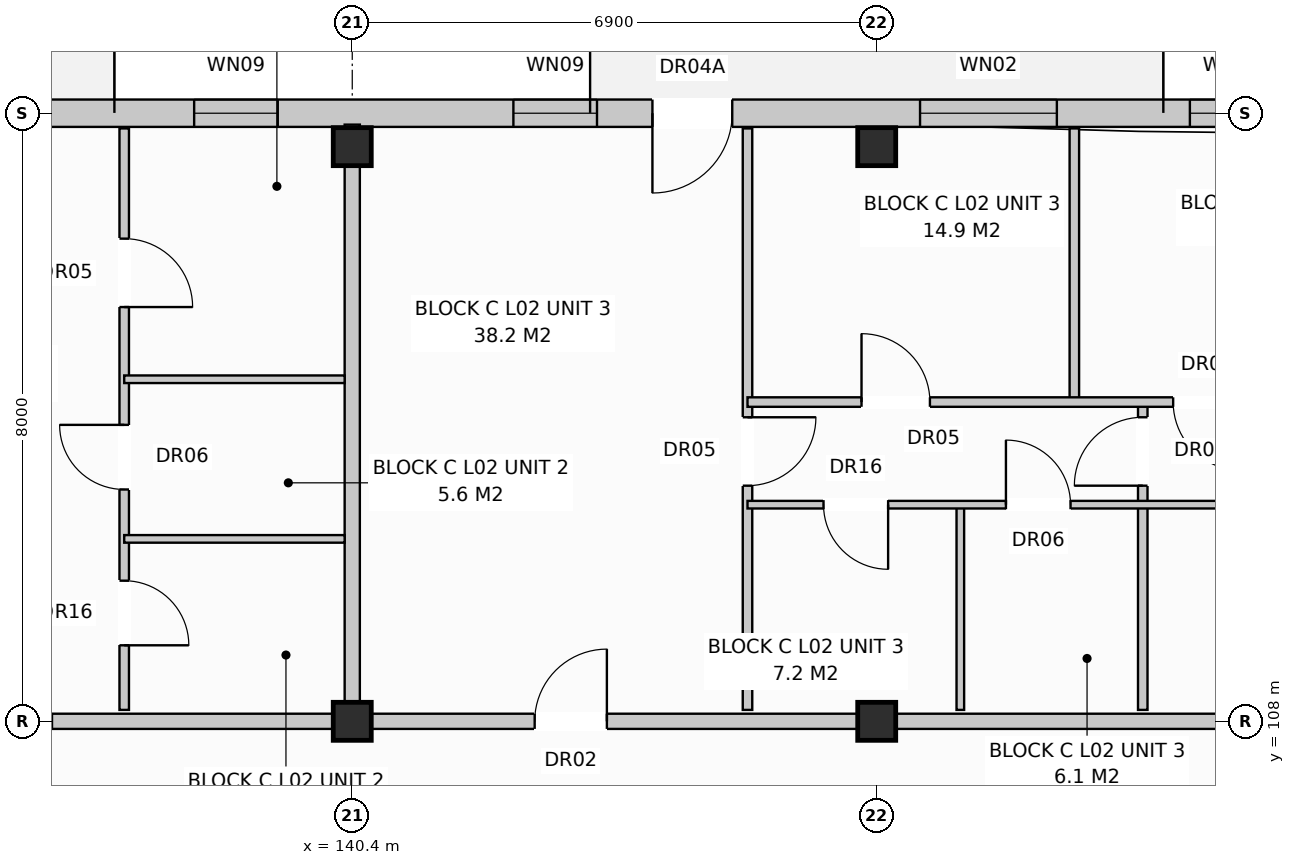
"""IFC4 building model, lengths in metres.
Left out: names, types, materials, properties, quantities, classifications, styles, units other than length and angle.
Written with IfcOpenShell. Run it as: python <this file> out.ifc"""

import sys

from ifc_helpers import new_model, si_unit, direction, frame, frame_2d, origin, origin_with_axes, origin_2d, place, context, subcontext, project, spatial, rectangle, extrude, element, fill, save


model = new_model("IFC4")
c1 = context("Model", 3, precision=1e-05, world=origin(), true_north=direction((0.0, 1.0)))
c2 = subcontext(c1, "Body", "Model", "MODEL_VIEW")
j1 = project(units=[si_unit("LENGTHUNIT", "METRE"), si_unit("PLANEANGLEUNIT", "RADIAN")], contexts=[c1])
p1 = place(None, origin())
s1 = spatial("IfcSite", under=j1, at=p1, CompositionType="ELEMENT")
p2 = place(p1, origin())
s2 = spatial("IfcBuilding", under=s1, at=p2, CompositionType="ELEMENT")
p3 = place(p2, frame((0.0, 0.0, 8.0)))
s3 = spatial("IfcBuildingStorey", under=s2, at=p3, CompositionType="ELEMENT", Elevation=8.0)
for number, where, z_axis, x_axis in (
    (1, (140.4, 108.0, 0.0), (0.0, 0.0, 1.0), (1.0, 0.0, 0.0)),
    (2, (140.4, 115.56, 0.0), (0.0, 0.0, 1.0), (1.0, 0.0, 0.0)),
    (3, (147.3, 108.0, 0.0), (0.0, 0.0, 1.0), (1.0, 0.0, 0.0)),
    (4, (147.3, 115.56, 0.0), (0.0, 0.0, 1.0), (1.0, 0.0, 0.0)),
):
    element("IfcColumn", number, at=place(p3, frame(where, z_axis=z_axis, x_axis=x_axis)), inside=s3, PredefinedType="COLUMN", context=c2, shape_type="SweptSolid", body=[
        extrude(rectangle(XDim=0.5, YDim=0.5, at=origin_2d()), origin(), (0.0, 0.0, 1.0), 3.2),
    ])
p4 = place(p3, frame((112.97, 116.0, 0.0), z_axis=(0.0, 0.0, 1.0), x_axis=(1.0, 0.0, 0.0)))
e5 = element("IfcWall", 5, at=p4, inside=s3, PredefinedType="STANDARD", context=c2, shape_type="SweptSolid", body=[
    extrude(rectangle(XDim=54.86, YDim=0.36, at=frame_2d((27.43, 0.0))), origin(), (0.0, 0.0, 1.0), 2.94),
])
p5 = place(p4, frame((4.876, 0.0, 0.0)))
e6 = element("IfcOpeningElement", 6, at=p5, cuts=e5, PredefinedType="OPENING", context=c2, shape_type="SweptSolid", body=[
    extrude(rectangle(XDim=1.05, YDim=2.12, at=frame_2d((0.525, 1.06))), frame((0.0, 0.192, 0.0), z_axis=(0.0, -1.0, 0.0), x_axis=(1.0, 0.0, 0.0)), (0.0, 0.0, 1.0), 0.384),
])
p6 = place(p4, frame((18.879, 0.0, 0.0)))
e7 = element("IfcOpeningElement", 7, at=p6, cuts=e5, PredefinedType="OPENING", context=c2, shape_type="SweptSolid", body=[
    extrude(rectangle(XDim=1.05, YDim=2.12, at=frame_2d((0.525, 1.06))), frame((0.0, 0.192, 0.0), z_axis=(0.0, -1.0, 0.0), x_axis=(1.0, 0.0, 0.0)), (0.0, 0.0, 1.0), 0.384),
])
p7 = place(p4, frame((31.379, 0.0, 0.0)))
e8 = element("IfcOpeningElement", 8, at=p7, cuts=e5, PredefinedType="OPENING", context=c2, shape_type="SweptSolid", body=[
    extrude(rectangle(XDim=1.05, YDim=2.12, at=frame_2d((0.525, 1.06))), frame((0.0, 0.192, 0.0), z_axis=(0.0, -1.0, 0.0), x_axis=(1.0, 0.0, 0.0)), (0.0, 0.0, 1.0), 0.384),
])
p8 = place(p4, frame((46.45, 0.0, 0.0)))
e9 = element("IfcOpeningElement", 9, at=p8, cuts=e5, PredefinedType="OPENING", context=c2, shape_type="SweptSolid", body=[
    extrude(rectangle(XDim=1.05, YDim=2.12, at=frame_2d((0.525, 1.06))), frame((0.0, 0.192, 0.0), z_axis=(0.0, -1.0, 0.0), x_axis=(1.0, 0.0, 0.0)), (0.0, 0.0, 1.0), 0.384),
])
p9 = place(p4, frame((2.45, 0.0, 0.72)))
e10 = element("IfcOpeningElement", 10, at=p9, cuts=e5, PredefinedType="OPENING", context=c2, shape_type="SweptSolid", body=[
    extrude(rectangle(XDim=1.1, YDim=1.5, at=frame_2d((0.55, 0.75))), frame((0.0, 0.192, 0.0), z_axis=(0.0, -1.0, 0.0), x_axis=(1.0, 0.0, 0.0)), (0.0, 0.0, 1.0), 0.384),
])
p10 = place(p4, frame((7.8, 0.0, 0.8)))
e11 = element("IfcOpeningElement", 11, at=p10, cuts=e5, PredefinedType="OPENING", context=c2, shape_type="SweptSolid", body=[
    extrude(rectangle(XDim=1.8, YDim=1.7, at=frame_2d((0.9, 0.85))), frame((0.0, 0.192, 0.0), z_axis=(0.0, -1.0, 0.0), x_axis=(1.0, 0.0, 0.0)), (0.0, 0.0, 1.0), 0.384),
])
p11 = place(p4, frame((14.55, 0.0, 0.72)))
e12 = element("IfcOpeningElement", 12, at=p11, cuts=e5, PredefinedType="OPENING", context=c2, shape_type="SweptSolid", body=[
    extrude(rectangle(XDim=1.1, YDim=1.5, at=frame_2d((0.55, 0.75))), frame((0.0, 0.192, 0.0), z_axis=(0.0, -1.0, 0.0), x_axis=(1.0, 0.0, 0.0)), (0.0, 0.0, 1.0), 0.384),
])
p12 = place(p4, frame((16.75, 0.0, 0.8)))
e13 = element("IfcOpeningElement", 13, at=p12, cuts=e5, PredefinedType="OPENING", context=c2, shape_type="SweptSolid", body=[
    extrude(rectangle(XDim=1.9, YDim=1.85, at=frame_2d((0.95, 0.925))), frame((0.0, 0.192, 0.0), z_axis=(0.0, -1.0, 0.0), x_axis=(1.0, 0.0, 0.0)), (0.0, 0.0, 1.0), 0.384),
])
p13 = place(p4, frame((21.6, 0.0, 0.8)))
e14 = element("IfcOpeningElement", 14, at=p13, cuts=e5, PredefinedType="OPENING", context=c2, shape_type="SweptSolid", body=[
    extrude(rectangle(XDim=1.8, YDim=1.7, at=frame_2d((0.9, 0.85))), frame((0.0, 0.192, 0.0), z_axis=(0.0, -1.0, 0.0), x_axis=(1.0, 0.0, 0.0)), (0.0, 0.0, 1.0), 0.384),
])
p14 = place(p4, frame((25.35, 0.0, 0.72)))
e15 = element("IfcOpeningElement", 15, at=p14, cuts=e5, PredefinedType="OPENING", context=c2, shape_type="SweptSolid", body=[
    extrude(rectangle(XDim=1.1, YDim=1.5, at=frame_2d((0.55, 0.75))), frame((0.0, 0.192, 0.0), z_axis=(0.0, -1.0, 0.0), x_axis=(1.0, 0.0, 0.0)), (0.0, 0.0, 1.0), 0.384),
])
p15 = place(p4, frame((29.55, 0.0, 0.72)))
e16 = element("IfcOpeningElement", 16, at=p15, cuts=e5, PredefinedType="OPENING", context=c2, shape_type="SweptSolid", body=[
    extrude(rectangle(XDim=1.1, YDim=1.5, at=frame_2d((0.55, 0.75))), frame((0.0, 0.192, 0.0), z_axis=(0.0, -1.0, 0.0), x_axis=(1.0, 0.0, 0.0)), (0.0, 0.0, 1.0), 0.384),
])
p16 = place(p4, frame((34.9, 0.0, 0.8)))
e17 = element("IfcOpeningElement", 17, at=p16, cuts=e5, PredefinedType="OPENING", context=c2, shape_type="SweptSolid", body=[
    extrude(rectangle(XDim=1.8, YDim=1.7, at=frame_2d((0.9, 0.85))), frame((0.0, 0.192, 0.0), z_axis=(0.0, -1.0, 0.0), x_axis=(1.0, 0.0, 0.0)), (0.0, 0.0, 1.0), 0.384),
])
p17 = place(p4, frame((38.45, 0.0, 0.72)))
e18 = element("IfcOpeningElement", 18, at=p17, cuts=e5, PredefinedType="OPENING", context=c2, shape_type="SweptSolid", body=[
    extrude(rectangle(XDim=1.1, YDim=1.5, at=frame_2d((0.55, 0.75))), frame((0.0, 0.192, 0.0), z_axis=(0.0, -1.0, 0.0), x_axis=(1.0, 0.0, 0.0)), (0.0, 0.0, 1.0), 0.384),
])
p18 = place(p4, frame((42.85, 0.0, 0.72)))
e19 = element("IfcOpeningElement", 19, at=p18, cuts=e5, PredefinedType="OPENING", context=c2, shape_type="SweptSolid", body=[
    extrude(rectangle(XDim=1.1, YDim=1.5, at=frame_2d((0.55, 0.75))), frame((0.0, 0.192, 0.0), z_axis=(0.0, -1.0, 0.0), x_axis=(1.0, 0.0, 0.0)), (0.0, 0.0, 1.0), 0.384),
])
p19 = place(p4, frame((49.2, 0.0, 0.8)))
e20 = element("IfcOpeningElement", 20, at=p19, cuts=e5, PredefinedType="OPENING", context=c2, shape_type="SweptSolid", body=[
    extrude(rectangle(XDim=1.8, YDim=1.7, at=frame_2d((0.9, 0.85))), frame((0.0, 0.192, 0.0), z_axis=(0.0, -1.0, 0.0), x_axis=(1.0, 0.0, 0.0)), (0.0, 0.0, 1.0), 0.384),
])
p20 = place(p4, frame((52.95, 0.0, 0.72)))
e21 = element("IfcOpeningElement", 21, at=p20, cuts=e5, PredefinedType="OPENING", context=c2, shape_type="SweptSolid", body=[
    extrude(rectangle(XDim=1.1, YDim=1.5, at=frame_2d((0.55, 0.75))), frame((0.0, 0.192, 0.0), z_axis=(0.0, -1.0, 0.0), x_axis=(1.0, 0.0, 0.0)), (0.0, 0.0, 1.0), 0.384),
])
p21 = place(p3, frame((140.4, 108.15, 0.0), z_axis=(0.0, 0.0, 1.0), x_axis=(0.0, 1.0, 0.0)))
e22 = element("IfcWall", 22, at=p21, inside=s3, PredefinedType="PARTITIONING", context=c2, shape_type="SweptSolid", body=[
    extrude(rectangle(XDim=7.7, YDim=0.2, at=frame_2d((3.85, 0.0))), origin(), (0.0, 0.0, 1.0), 2.94),
])
p22 = place(p3, frame((133.5, 108.0, 0.0), z_axis=(0.0, 0.0, 1.0), x_axis=(1.0, 0.0, 0.0)))
e23 = element("IfcWall", 23, at=p22, inside=s3, PredefinedType="PARTITIONING", context=c2, shape_type="SweptSolid", body=[
    extrude(rectangle(XDim=6.9, YDim=0.2, at=frame_2d((3.45, 0.0))), origin(), (0.0, 0.0, 1.0), 2.38),
])
p23 = place(p22, frame((2.0, 0.0, 0.0)))
e24 = element("IfcOpeningElement", 24, at=p23, cuts=e23, PredefinedType="OPENING", context=c2, shape_type="SweptSolid", body=[
    extrude(rectangle(XDim=0.95, YDim=2.15, at=frame_2d((0.475, 1.075))), frame((0.0, 0.112, 0.0), z_axis=(0.0, -1.0, 0.0), x_axis=(1.0, 0.0, 0.0)), (0.0, 0.0, 1.0), 0.224),
])
p24 = place(p3, frame((137.4, 108.15, 0.0), z_axis=(0.0, 0.0, 1.0), x_axis=(0.0, 1.0, 0.0)))
e25 = element("IfcWall", 25, at=p24, inside=s3, PredefinedType="PARTITIONING", context=c2, shape_type="SweptSolid", body=[
    extrude(rectangle(XDim=7.65, YDim=0.125, at=frame_2d((3.825, 0.0))), origin(), (0.0, 0.0, 1.0), 2.94),
])
p25 = place(p24, frame((0.85, 0.0, 0.0)))
e26 = element("IfcOpeningElement", 26, at=p25, cuts=e25, PredefinedType="OPENING", context=c2, shape_type="SweptSolid", body=[
    extrude(rectangle(XDim=0.85, YDim=2.1, at=frame_2d((0.425, 1.05))), frame((0.0, 0.074, 0.0), z_axis=(0.0, -1.0, 0.0), x_axis=(1.0, 0.0, 0.0)), (0.0, 0.0, 1.0), 0.149),
])
p26 = place(p24, frame((2.9, 0.0, 0.0)))
e27 = element("IfcOpeningElement", 27, at=p26, cuts=e25, PredefinedType="OPENING", context=c2, shape_type="SweptSolid", body=[
    extrude(rectangle(XDim=0.85, YDim=2.05, at=frame_2d((0.425, 1.025))), frame((0.0, 0.074, 0.0), z_axis=(0.0, -1.0, 0.0), x_axis=(1.0, 0.0, 0.0)), (0.0, 0.0, 1.0), 0.149),
])
p27 = place(p24, frame((5.3, 0.0, 0.0)))
e28 = element("IfcOpeningElement", 28, at=p27, cuts=e25, PredefinedType="OPENING", context=c2, shape_type="SweptSolid", body=[
    extrude(rectangle(XDim=0.9, YDim=2.1, at=frame_2d((0.45, 1.05))), frame((0.0, 0.074, 0.0), z_axis=(0.0, -1.0, 0.0), x_axis=(1.0, 0.0, 0.0)), (0.0, 0.0, 1.0), 0.149),
])
for number, where, z_axis, x_axis in (
    (29, (137.4, 110.4, 0.0), (0.0, 0.0, 1.0), (1.0, 0.0, 0.0)),
    (30, (137.4, 112.5, 0.0), (0.0, 0.0, 1.0), (1.0, 0.0, 0.0)),
):
    element("IfcWall", number, at=place(p3, frame(where, z_axis=z_axis, x_axis=x_axis)), inside=s3, PredefinedType="PARTITIONING", context=c2, shape_type="SweptSolid", body=[
        extrude(rectangle(XDim=2.9, YDim=0.1, at=frame_2d((1.45, 0.0))), origin(), (0.0, 0.0, 1.0), 2.94),
    ])
p28 = place(p3, frame((140.4, 108.0, 0.0), z_axis=(0.0, 0.0, 1.0), x_axis=(1.0, 0.0, 0.0)))
e31 = element("IfcWall", 31, at=p28, inside=s3, PredefinedType="PARTITIONING", context=c2, shape_type="SweptSolid", body=[
    extrude(rectangle(XDim=13.8, YDim=0.2, at=frame_2d((6.9, 0.0))), origin(), (0.0, 0.0, 1.0), 2.38),
])
p29 = place(p28, frame((2.4, 0.0, 0.0)))
e32 = element("IfcOpeningElement", 32, at=p29, cuts=e31, PredefinedType="OPENING", context=c2, shape_type="SweptSolid", body=[
    extrude(rectangle(XDim=0.95, YDim=2.15, at=frame_2d((0.475, 1.075))), frame((0.0, 0.112, 0.0), z_axis=(0.0, -1.0, 0.0), x_axis=(1.0, 0.0, 0.0)), (0.0, 0.0, 1.0), 0.224),
])
p30 = place(p3, frame((145.6, 108.15, 0.0), z_axis=(0.0, 0.0, 1.0), x_axis=(0.0, 1.0, 0.0)))
e33 = element("IfcWall", 33, at=p30, inside=s3, PredefinedType="PARTITIONING", context=c2, shape_type="SweptSolid", body=[
    extrude(rectangle(XDim=7.65, YDim=0.125, at=frame_2d((3.825, 0.0))), origin(), (0.0, 0.0, 1.0), 2.94),
])
p31 = place(p30, frame((2.95, 0.0, 0.0)))
e34 = element("IfcOpeningElement", 34, at=p31, cuts=e33, PredefinedType="OPENING", context=c2, shape_type="SweptSolid", body=[
    extrude(rectangle(XDim=0.9, YDim=2.1, at=frame_2d((0.45, 1.05))), frame((0.0, 0.074, 0.0), z_axis=(0.0, -1.0, 0.0), x_axis=(1.0, 0.0, 0.0)), (0.0, 0.0, 1.0), 0.149),
])
p32 = place(p3, frame((148.4, 108.15, 0.0), z_axis=(0.0, 0.0, 1.0), x_axis=(0.0, 1.0, 0.0)))
e35 = element("IfcWall", 35, at=p32, inside=s3, PredefinedType="PARTITIONING", context=c2, shape_type="SweptSolid", body=[
    extrude(rectangle(XDim=2.7, YDim=0.1, at=frame_2d((1.35, 0.0))), origin(), (0.0, 0.0, 1.0), 2.94),
])
p33 = place(p3, frame((150.8, 108.15, 0.0), z_axis=(0.0, 0.0, 1.0), x_axis=(0.0, 1.0, 0.0)))
e36 = element("IfcWall", 36, at=p33, inside=s3, PredefinedType="PARTITIONING", context=c2, shape_type="SweptSolid", body=[
    extrude(rectangle(XDim=4.05, YDim=0.125, at=frame_2d((2.025, 0.0))), origin(), (0.0, 0.0, 1.0), 2.94),
])
p34 = place(p33, frame((2.95, 0.0, 0.0)))
e37 = element("IfcOpeningElement", 37, at=p34, cuts=e36, PredefinedType="OPENING", context=c2, shape_type="SweptSolid", body=[
    extrude(rectangle(XDim=0.9, YDim=2.1, at=frame_2d((0.45, 1.05))), frame((0.0, 0.074, 0.0), z_axis=(0.0, -1.0, 0.0), x_axis=(1.0, 0.0, 0.0)), (0.0, 0.0, 1.0), 0.149),
])
p35 = place(p3, frame((149.9, 112.2, 0.0), z_axis=(0.0, 0.0, 1.0), x_axis=(0.0, 1.0, 0.0)))
e38 = element("IfcWall", 38, at=p35, inside=s3, PredefinedType="PARTITIONING", context=c2, shape_type="SweptSolid", body=[
    extrude(rectangle(XDim=3.6, YDim=0.125, at=frame_2d((1.8, 0.0))), origin(), (0.0, 0.0, 1.0), 2.94),
])
p36 = place(p3, frame((145.6, 110.85, 0.0), z_axis=(0.0, 0.0, 1.0), x_axis=(1.0, 0.0, 0.0)))
e39 = element("IfcWall", 39, at=p36, inside=s3, PredefinedType="PARTITIONING", context=c2, shape_type="SweptSolid", body=[
    extrude(rectangle(XDim=8.5, YDim=0.1, at=frame_2d((4.25, 0.0))), origin(), (0.0, 0.0, 1.0), 2.94),
])
p37 = place(p36, frame((1.0, 0.0, 0.0)))
e40 = element("IfcOpeningElement", 40, at=p37, cuts=e39, PredefinedType="OPENING", context=c2, shape_type="SweptSolid", body=[
    extrude(rectangle(XDim=0.85, YDim=2.1, at=frame_2d((0.425, 1.05))), frame((0.0, 0.062, 0.0), z_axis=(0.0, -1.0, 0.0), x_axis=(1.0, 0.0, 0.0)), (0.0, 0.0, 1.0), 0.124),
])
p38 = place(p36, frame((3.4, 0.0, 0.0)))
e41 = element("IfcOpeningElement", 41, at=p38, cuts=e39, PredefinedType="OPENING", context=c2, shape_type="SweptSolid", body=[
    extrude(rectangle(XDim=0.85, YDim=2.05, at=frame_2d((0.425, 1.025))), frame((0.0, 0.062, 0.0), z_axis=(0.0, -1.0, 0.0), x_axis=(1.0, 0.0, 0.0)), (0.0, 0.0, 1.0), 0.124),
])
p39 = place(p36, frame((6.2, 0.0, 0.0)))
e42 = element("IfcOpeningElement", 42, at=p39, cuts=e39, PredefinedType="OPENING", context=c2, shape_type="SweptSolid", body=[
    extrude(rectangle(XDim=0.85, YDim=2.05, at=frame_2d((0.425, 1.025))), frame((0.0, 0.062, 0.0), z_axis=(0.0, -1.0, 0.0), x_axis=(1.0, 0.0, 0.0)), (0.0, 0.0, 1.0), 0.124),
])
p40 = place(p3, frame((145.6, 112.2, 0.0), z_axis=(0.0, 0.0, 1.0), x_axis=(1.0, 0.0, 0.0)))
e43 = element("IfcWall", 43, at=p40, inside=s3, PredefinedType="PARTITIONING", context=c2, shape_type="SweptSolid", body=[
    extrude(rectangle(XDim=8.5, YDim=0.125, at=frame_2d((4.25, 0.0))), origin(), (0.0, 0.0, 1.0), 2.94),
])
p41 = place(p40, frame((1.5, 0.0, 0.0)))
e44 = element("IfcOpeningElement", 44, at=p41, cuts=e43, PredefinedType="OPENING", context=c2, shape_type="SweptSolid", body=[
    extrude(rectangle(XDim=0.9, YDim=2.1, at=frame_2d((0.45, 1.05))), frame((0.0, 0.074, 0.0), z_axis=(0.0, -1.0, 0.0), x_axis=(1.0, 0.0, 0.0)), (0.0, 0.0, 1.0), 0.149),
])
p42 = place(p40, frame((5.6, 0.0, 0.0)))
e45 = element("IfcOpeningElement", 45, at=p42, cuts=e43, PredefinedType="OPENING", context=c2, shape_type="SweptSolid", body=[
    extrude(rectangle(XDim=0.9, YDim=2.1, at=frame_2d((0.45, 1.05))), frame((0.0, 0.074, 0.0), z_axis=(0.0, -1.0, 0.0), x_axis=(1.0, 0.0, 0.0)), (0.0, 0.0, 1.0), 0.149),
])
p43 = place(p7, frame((1.05, 0.0, 0.0), z_axis=(0.0, 0.0, 1.0), x_axis=(-1.0, 0.0, 0.0)))
e46 = element("IfcDoor", 46, at=p43, inside=s3, OperationType="SINGLE_SWING_LEFT", PredefinedType="DOOR", context=c2, shape_type="SweptSolid", body=[
    extrude(rectangle(XDim=1.05, YDim=2.12, at=frame_2d((0.525, 1.06))), frame((0.0, 0.025, 0.0), z_axis=(0.0, -1.0, 0.0), x_axis=(1.0, 0.0, 0.0)), (0.0, 0.0, 1.0), 0.05),
])
fill(e8, e46)
p44 = place(p14, origin_with_axes())
e47 = element("IfcWindow", 47, at=p44, inside=s3, PartitioningType="SINGLE_PANEL", PredefinedType="WINDOW", context=c2, shape_type="SweptSolid", body=[
    extrude(rectangle(XDim=1.1, YDim=1.5, at=frame_2d((0.55, 0.75))), frame((0.0, 0.03, 0.0), z_axis=(0.0, -1.0, 0.0), x_axis=(1.0, 0.0, 0.0)), (0.0, 0.0, 1.0), 0.06),
])
fill(e15, e47)
p45 = place(p15, origin_with_axes())
e48 = element("IfcWindow", 48, at=p45, inside=s3, PartitioningType="SINGLE_PANEL", PredefinedType="WINDOW", context=c2, shape_type="SweptSolid", body=[
    extrude(rectangle(XDim=1.1, YDim=1.5, at=frame_2d((0.55, 0.75))), frame((0.0, 0.03, 0.0), z_axis=(0.0, -1.0, 0.0), x_axis=(1.0, 0.0, 0.0)), (0.0, 0.0, 1.0), 0.06),
])
fill(e16, e48)
p46 = place(p16, origin_with_axes())
e49 = element("IfcWindow", 49, at=p46, inside=s3, PartitioningType="SINGLE_PANEL", PredefinedType="WINDOW", context=c2, shape_type="SweptSolid", body=[
    extrude(rectangle(XDim=1.8, YDim=1.7, at=frame_2d((0.9, 0.85))), frame((0.0, 0.03, 0.0), z_axis=(0.0, -1.0, 0.0), x_axis=(1.0, 0.0, 0.0)), (0.0, 0.0, 1.0), 0.06),
])
fill(e17, e49)
p47 = place(p17, origin_with_axes())
e50 = element("IfcWindow", 50, at=p47, inside=s3, PartitioningType="SINGLE_PANEL", PredefinedType="WINDOW", context=c2, shape_type="SweptSolid", body=[
    extrude(rectangle(XDim=1.1, YDim=1.5, at=frame_2d((0.55, 0.75))), frame((0.0, 0.03, 0.0), z_axis=(0.0, -1.0, 0.0), x_axis=(1.0, 0.0, 0.0)), (0.0, 0.0, 1.0), 0.06),
])
fill(e18, e50)
p48 = place(p23, origin_with_axes())
e51 = element("IfcDoor", 51, at=p48, inside=s3, OperationType="SINGLE_SWING_LEFT", PredefinedType="DOOR", context=c2, shape_type="SweptSolid", body=[
    extrude(rectangle(XDim=0.95, YDim=2.15, at=frame_2d((0.475, 1.075))), frame((0.0, 0.025, 0.0), z_axis=(0.0, -1.0, 0.0), x_axis=(1.0, 0.0, 0.0)), (0.0, 0.0, 1.0), 0.05),
])
fill(e24, e51)
p49 = place(p25, frame((0.85, 0.0, 0.0), z_axis=(0.0, 0.0, 1.0), x_axis=(-1.0, 0.0, 0.0)))
e52 = element("IfcDoor", 52, at=p49, inside=s3, OperationType="SINGLE_SWING_LEFT", PredefinedType="DOOR", context=c2, shape_type="SweptSolid", body=[
    extrude(rectangle(XDim=0.85, YDim=2.1, at=frame_2d((0.425, 1.05))), frame((0.0, 0.025, 0.0), z_axis=(0.0, -1.0, 0.0), x_axis=(1.0, 0.0, 0.0)), (0.0, 0.0, 1.0), 0.05),
])
fill(e26, e52)
p50 = place(p26, origin_with_axes())
e53 = element("IfcDoor", 53, at=p50, inside=s3, OperationType="SINGLE_SWING_RIGHT", PredefinedType="DOOR", context=c2, shape_type="SweptSolid", body=[
    extrude(rectangle(XDim=0.85, YDim=2.05, at=frame_2d((0.425, 1.025))), frame((0.0, 0.025, 0.0), z_axis=(0.0, -1.0, 0.0), x_axis=(1.0, 0.0, 0.0)), (0.0, 0.0, 1.0), 0.05),
])
fill(e27, e53)
p51 = place(p27, frame((0.9, 0.0, 0.0), z_axis=(0.0, 0.0, 1.0), x_axis=(-1.0, 0.0, 0.0)))
e54 = element("IfcDoor", 54, at=p51, inside=s3, OperationType="SINGLE_SWING_LEFT", PredefinedType="DOOR", context=c2, shape_type="SweptSolid", body=[
    extrude(rectangle(XDim=0.9, YDim=2.1, at=frame_2d((0.45, 1.05))), frame((0.0, 0.025, 0.0), z_axis=(0.0, -1.0, 0.0), x_axis=(1.0, 0.0, 0.0)), (0.0, 0.0, 1.0), 0.05),
])
fill(e28, e54)
p52 = place(p29, origin_with_axes())
e55 = element("IfcDoor", 55, at=p52, inside=s3, OperationType="SINGLE_SWING_RIGHT", PredefinedType="DOOR", context=c2, shape_type="SweptSolid", body=[
    extrude(rectangle(XDim=0.95, YDim=2.15, at=frame_2d((0.475, 1.075))), frame((0.0, 0.025, 0.0), z_axis=(0.0, -1.0, 0.0), x_axis=(1.0, 0.0, 0.0)), (0.0, 0.0, 1.0), 0.05),
])
fill(e32, e55)
p53 = place(p31, frame((0.9, 0.0, 0.0), z_axis=(0.0, 0.0, 1.0), x_axis=(-1.0, 0.0, 0.0)))
e56 = element("IfcDoor", 56, at=p53, inside=s3, OperationType="SINGLE_SWING_RIGHT", PredefinedType="DOOR", context=c2, shape_type="SweptSolid", body=[
    extrude(rectangle(XDim=0.9, YDim=2.1, at=frame_2d((0.45, 1.05))), frame((0.0, 0.025, 0.0), z_axis=(0.0, -1.0, 0.0), x_axis=(1.0, 0.0, 0.0)), (0.0, 0.0, 1.0), 0.05),
])
fill(e34, e56)
p54 = place(p34, origin_with_axes())
e57 = element("IfcDoor", 57, at=p54, inside=s3, OperationType="SINGLE_SWING_LEFT", PredefinedType="DOOR", context=c2, shape_type="SweptSolid", body=[
    extrude(rectangle(XDim=0.9, YDim=2.1, at=frame_2d((0.45, 1.05))), frame((0.0, 0.025, 0.0), z_axis=(0.0, -1.0, 0.0), x_axis=(1.0, 0.0, 0.0)), (0.0, 0.0, 1.0), 0.05),
])
fill(e37, e57)
p55 = place(p37, frame((0.85, 0.0, 0.0), z_axis=(0.0, 0.0, 1.0), x_axis=(-1.0, 0.0, 0.0)))
e58 = element("IfcDoor", 58, at=p55, inside=s3, OperationType="SINGLE_SWING_RIGHT", PredefinedType="DOOR", context=c2, shape_type="SweptSolid", body=[
    extrude(rectangle(XDim=0.85, YDim=2.1, at=frame_2d((0.425, 1.05))), frame((0.0, 0.025, 0.0), z_axis=(0.0, -1.0, 0.0), x_axis=(1.0, 0.0, 0.0)), (0.0, 0.0, 1.0), 0.05),
])
fill(e40, e58)
p56 = place(p38, origin_with_axes())
e59 = element("IfcDoor", 59, at=p56, inside=s3, OperationType="SINGLE_SWING_LEFT", PredefinedType="DOOR", context=c2, shape_type="SweptSolid", body=[
    extrude(rectangle(XDim=0.85, YDim=2.05, at=frame_2d((0.425, 1.025))), frame((0.0, 0.025, 0.0), z_axis=(0.0, -1.0, 0.0), x_axis=(1.0, 0.0, 0.0)), (0.0, 0.0, 1.0), 0.05),
])
fill(e41, e59)
p57 = place(p41, origin_with_axes())
e60 = element("IfcDoor", 60, at=p57, inside=s3, OperationType="SINGLE_SWING_LEFT", PredefinedType="DOOR", context=c2, shape_type="SweptSolid", body=[
    extrude(rectangle(XDim=0.9, YDim=2.1, at=frame_2d((0.45, 1.05))), frame((0.0, 0.025, 0.0), z_axis=(0.0, -1.0, 0.0), x_axis=(1.0, 0.0, 0.0)), (0.0, 0.0, 1.0), 0.05),
])
fill(e44, e60)
p58 = place(p42, frame((0.9, 0.0, 0.0), z_axis=(0.0, 0.0, 1.0), x_axis=(-1.0, 0.0, 0.0)))
e61 = element("IfcDoor", 61, at=p58, inside=s3, OperationType="SINGLE_SWING_RIGHT", PredefinedType="DOOR", context=c2, shape_type="SweptSolid", body=[
    extrude(rectangle(XDim=0.9, YDim=2.1, at=frame_2d((0.45, 1.05))), frame((0.0, 0.025, 0.0), z_axis=(0.0, -1.0, 0.0), x_axis=(1.0, 0.0, 0.0)), (0.0, 0.0, 1.0), 0.05),
])
fill(e45, e61)
save(model, sys.argv[1])
